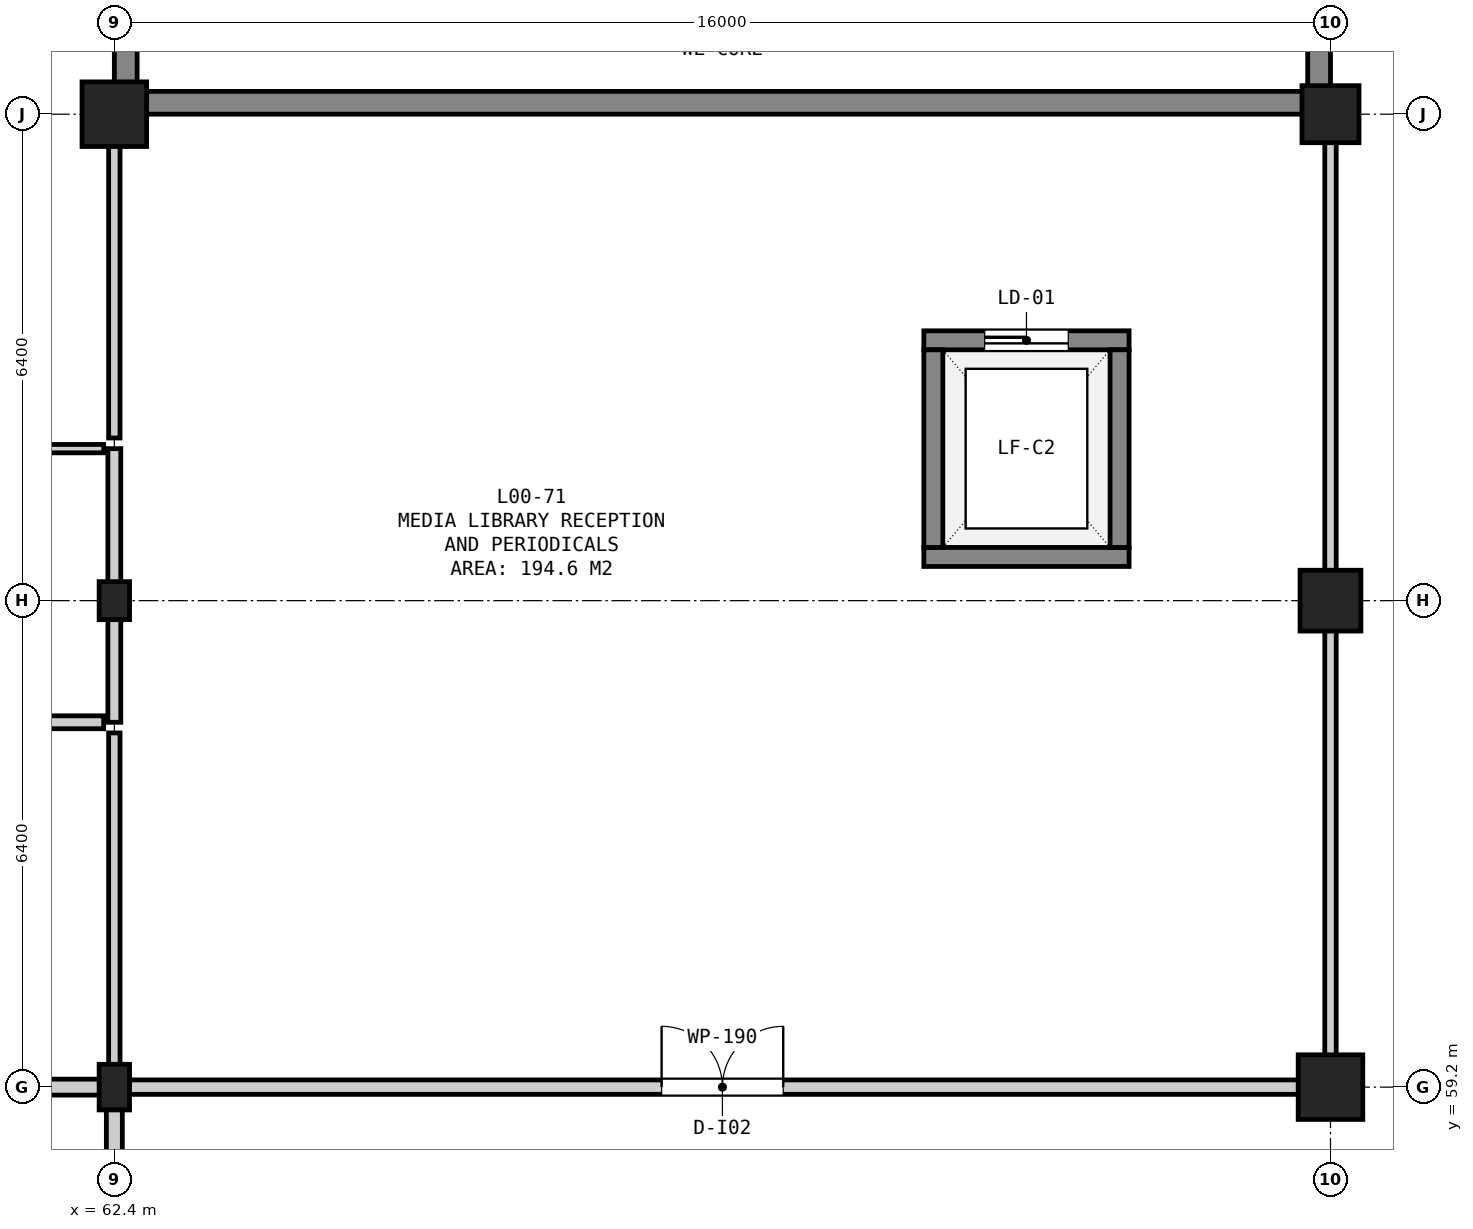
"""IFC4 building model, lengths in metres.
Left out: names, types, materials, properties, quantities, classifications, styles, units other than length and angle.
Written with IfcOpenShell. Run it as: python <this file> out.ifc"""

import sys

from ifc_helpers import new_model, si_unit, direction, frame, frame_2d, origin, origin_2d, place, context, subcontext, project, spatial, rectangle, extrude, element, fill, save


model = new_model("IFC4")
c1 = context("Model", 3, precision=1e-05, world=origin(), true_north=direction((0.0, 1.0)))
c2 = subcontext(c1, "Body", "Model", "MODEL_VIEW")
j1 = project(units=[si_unit("LENGTHUNIT", "METRE"), si_unit("PLANEANGLEUNIT", "RADIAN")], contexts=[c1])
p1 = place(None, origin())
s1 = spatial("IfcSite", under=j1, at=p1, CompositionType="ELEMENT")
p2 = place(p1, origin())
s2 = spatial("IfcBuilding", under=s1, at=p2, CompositionType="ELEMENT")
p3 = place(p2, origin())
s3 = spatial("IfcBuildingStorey", under=s2, at=p3, CompositionType="ELEMENT", Elevation=0.0)
p4 = place(p3, frame((62.4, 59.2, 0.0), z_axis=(0.0, 0.0, 1.0), x_axis=(1.0, 0.0, 0.0)))
e1 = element("IfcColumn", 1, at=p4, inside=s3, PredefinedType="COLUMN", context=c2, shape_type="SweptSolid", body=[
    extrude(rectangle(XDim=0.4, YDim=0.6, at=origin_2d()), origin(), (0.0, 0.0, 1.0), 5.4),
])
p5 = place(p3, frame((62.4, 65.6, 0.0), z_axis=(0.0, 0.0, 1.0), x_axis=(1.0, 0.0, 0.0)))
e2 = element("IfcColumn", 2, at=p5, inside=s3, PredefinedType="COLUMN", context=c2, shape_type="SweptSolid", body=[
    extrude(rectangle(XDim=0.4, YDim=0.5, at=origin_2d()), origin(), (0.0, 0.0, 1.0), 5.4),
])
for number, where, z_axis, x_axis in (
    (3, (62.4, 72.0, 0.0), (0.0, 0.0, 1.0), (1.0, 0.0, 0.0)),
    (4, (78.4, 59.2, 0.0), (0.0, 0.0, 1.0), (1.0, 0.0, 0.0)),
):
    element("IfcColumn", number, at=place(p3, frame(where, z_axis=z_axis, x_axis=x_axis)), inside=s3, PredefinedType="COLUMN", context=c2, shape_type="SweptSolid", body=[
        extrude(rectangle(XDim=0.85, YDim=0.85, at=origin_2d()), origin(), (0.0, 0.0, 1.0), 5.4),
    ])
p6 = place(p3, frame((78.4, 65.6, 0.0), z_axis=(0.0, 0.0, 1.0), x_axis=(1.0, 0.0, 0.0)))
e5 = element("IfcColumn", 5, at=p6, inside=s3, PredefinedType="COLUMN", context=c2, shape_type="SweptSolid", body=[
    extrude(rectangle(XDim=0.8, YDim=0.8, at=origin_2d()), origin(), (0.0, 0.0, 1.0), 5.4),
])
p7 = place(p3, frame((78.4, 72.0, 0.0), z_axis=(0.0, 0.0, 1.0), x_axis=(1.0, 0.0, 0.0)))
e6 = element("IfcColumn", 6, at=p7, inside=s3, PredefinedType="COLUMN", context=c2, shape_type="SweptSolid", body=[
    extrude(rectangle(XDim=0.75, YDim=0.75, at=origin_2d()), origin(), (0.0, 0.0, 1.0), 5.4),
])
p8 = place(p3, frame((62.7, 72.15, 0.0), z_axis=(0.0, 0.0, 1.0), x_axis=(1.0, 0.0, 0.0)))
e7 = element("IfcWall", 7, at=p8, inside=s3, PredefinedType="SHEAR", context=c2, shape_type="SweptSolid", body=[
    extrude(rectangle(XDim=15.4, YDim=0.3, at=frame_2d((7.7, 0.0))), origin(), (0.0, 0.0, 1.0), 5.08),
])
for number, where, z_axis, x_axis in (
    (8, (62.55, 72.0, 0.0), (0.0, 0.0, 1.0), (0.0, 1.0, 0.0)),
    (9, (78.25, 72.0, 0.0), (0.0, 0.0, 1.0), (0.0, 1.0, 0.0)),
):
    element("IfcWall", number, at=place(p3, frame(where, z_axis=z_axis, x_axis=x_axis)), inside=s3, PredefinedType="SHEAR", context=c2, shape_type="SweptSolid", body=[
        extrude(rectangle(XDim=15.2, YDim=0.3, at=frame_2d((7.6, 0.0))), origin(), (0.0, 0.0, 1.0), 5.08),
    ])
p9 = place(p3, frame((73.05, 66.175, 0.0), z_axis=(0.0, 0.0, 1.0), x_axis=(1.0, 0.0, 0.0)))
e10 = element("IfcWall", 10, at=p9, inside=s3, PredefinedType="SHEAR", context=c2, shape_type="SweptSolid", body=[
    extrude(rectangle(XDim=2.7, YDim=0.25, at=frame_2d((1.35, 0.0))), origin(), (0.0, 0.0, 1.0), 5.08),
])
p10 = place(p3, frame((73.05, 69.025, 0.0), z_axis=(0.0, 0.0, 1.0), x_axis=(1.0, 0.0, 0.0)))
e11 = element("IfcWall", 11, at=p10, inside=s3, PredefinedType="SHEAR", context=c2, shape_type="SweptSolid", body=[
    extrude(rectangle(XDim=2.7, YDim=0.25, at=frame_2d((1.35, 0.0))), origin(), (0.0, 0.0, 1.0), 5.08),
])
p11 = place(p10, frame((0.8, 0.0, 0.0)))
e12 = element("IfcOpeningElement", 12, at=p11, cuts=e11, PredefinedType="OPENING", context=c2, shape_type="SweptSolid", body=[
    extrude(rectangle(XDim=1.1, YDim=2.15, at=frame_2d((0.55, 1.075))), frame((0.0, 0.137, 0.0), z_axis=(0.0, -1.0, 0.0), x_axis=(1.0, 0.0, 0.0)), (0.0, 0.0, 1.0), 0.274),
])
for number, where, z_axis, x_axis in (
    (13, (73.175, 66.3, 0.0), (0.0, 0.0, 1.0), (0.0, 1.0, 0.0)),
    (14, (75.625, 66.3, 0.0), (0.0, 0.0, 1.0), (0.0, 1.0, 0.0)),
):
    element("IfcWall", number, at=place(p3, frame(where, z_axis=z_axis, x_axis=x_axis)), inside=s3, PredefinedType="SHEAR", context=c2, shape_type="SweptSolid", body=[
        extrude(rectangle(XDim=2.6, YDim=0.25, at=frame_2d((1.3, 0.0))), origin(), (0.0, 0.0, 1.0), 5.08),
    ])
p12 = place(p3, frame((48.14, 59.2, 0.0), z_axis=(0.0, 0.0, 1.0), x_axis=(1.0, 0.0, 0.0)))
e15 = element("IfcWall", 15, at=p12, inside=s3, PredefinedType="SOLIDWALL", context=c2, shape_type="SweptSolid", body=[
    extrude(rectangle(XDim=14.12, YDim=0.21, at=frame_2d((7.06, 0.0))), origin(), (0.0, 0.0, 1.0), 4.575),
])
p13 = place(p12, frame((2.585, 0.0, 0.0)))
e16 = element("IfcOpeningElement", 16, at=p13, cuts=e15, PredefinedType="OPENING", context=c2, shape_type="SweptSolid", body=[
    extrude(rectangle(XDim=0.95, YDim=2.15, at=frame_2d((0.475, 1.075))), frame((0.0, 0.117, 0.0), z_axis=(0.0, -1.0, 0.0), x_axis=(1.0, 0.0, 0.0)), (0.0, 0.0, 1.0), 0.234),
])
p14 = place(p12, frame((10.735, 0.0, 0.0)))
e17 = element("IfcOpeningElement", 17, at=p14, cuts=e15, PredefinedType="OPENING", context=c2, shape_type="SweptSolid", body=[
    extrude(rectangle(XDim=1.05, YDim=2.15, at=frame_2d((0.525, 1.075))), frame((0.0, 0.117, 0.0), z_axis=(0.0, -1.0, 0.0), x_axis=(1.0, 0.0, 0.0)), (0.0, 0.0, 1.0), 0.234),
])
p15 = place(p3, frame((62.4, 51.34, 0.0), z_axis=(0.0, 0.0, 1.0), x_axis=(0.0, 1.0, 0.0)))
e18 = element("IfcWall", 18, at=p15, inside=s3, PredefinedType="SOLIDWALL", context=c2, shape_type="SweptSolid", body=[
    extrude(rectangle(XDim=7.72, YDim=0.21, at=frame_2d((3.86, 0.0))), origin(), (0.0, 0.0, 1.0), 4.375),
])
p16 = place(p15, frame((3.06, 0.0, 0.0)))
e19 = element("IfcOpeningElement", 19, at=p16, cuts=e18, PredefinedType="OPENING", context=c2, shape_type="SweptSolid", body=[
    extrude(rectangle(XDim=1.6, YDim=2.2, at=frame_2d((0.8, 1.1))), frame((0.0, 0.117, 0.0), z_axis=(0.0, -1.0, 0.0), x_axis=(1.0, 0.0, 0.0)), (0.0, 0.0, 1.0), 0.234),
])
p17 = place(p3, frame((56.54, 64.0, 0.0), z_axis=(0.0, 0.0, 1.0), x_axis=(1.0, 0.0, 0.0)))
e20 = element("IfcWall", 20, at=p17, inside=s3, PredefinedType="PARTITIONING", context=c2, shape_type="SweptSolid", body=[
    extrude(rectangle(XDim=5.72, YDim=0.17, at=frame_2d((2.86, 0.0))), origin(), (0.0, 0.0, 1.0), 5.08),
])
p18 = place(p3, frame((62.4, 59.34, 0.0), z_axis=(0.0, 0.0, 1.0), x_axis=(0.0, 1.0, 0.0)))
e21 = element("IfcWall", 21, at=p18, inside=s3, PredefinedType="PARTITIONING", context=c2, shape_type="SweptSolid", body=[
    extrude(rectangle(XDim=4.52, YDim=0.15, at=frame_2d((2.26, 0.0))), origin(), (0.0, 0.0, 1.0), 4.275),
])
p19 = place(p3, frame((56.4, 67.6, 0.0), z_axis=(0.0, 0.0, 1.0), x_axis=(1.0, 0.0, 0.0)))
e22 = element("IfcWall", 22, at=p19, inside=s3, PredefinedType="PARTITIONING", context=c2, shape_type="SweptSolid", body=[
    extrude(rectangle(XDim=5.86, YDim=0.11, at=frame_2d((2.93, 0.0))), origin(), (0.0, 0.0, 1.0), 5.08),
])
p20 = place(p3, frame((62.4, 67.74, 0.0), z_axis=(0.0, 0.0, 1.0), x_axis=(0.0, 1.0, 0.0)))
e23 = element("IfcWall", 23, at=p20, inside=s3, PredefinedType="PARTITIONING", context=c2, shape_type="SweptSolid", body=[
    extrude(rectangle(XDim=4.12, YDim=0.15, at=frame_2d((2.06, 0.0))), origin(), (0.0, 0.0, 1.0), 4.325),
])
p21 = place(p3, frame((62.54, 59.2, 0.0), z_axis=(0.0, 0.0, 1.0), x_axis=(1.0, 0.0, 0.0)))
e24 = element("IfcWall", 24, at=p21, inside=s3, PredefinedType="PARTITIONING", context=c2, shape_type="SweptSolid", body=[
    extrude(rectangle(XDim=15.72, YDim=0.19, at=frame_2d((7.86, 0.0))), origin(), (0.0, 0.0, 1.0), 4.425),
])
p22 = place(p21, frame((7.06, 0.0, 0.0)))
e25 = element("IfcOpeningElement", 25, at=p22, cuts=e24, PredefinedType="OPENING", context=c2, shape_type="SweptSolid", body=[
    extrude(rectangle(XDim=1.6, YDim=2.2, at=frame_2d((0.8, 1.1))), frame((0.0, 0.107, 0.0), z_axis=(0.0, -1.0, 0.0), x_axis=(1.0, 0.0, 0.0)), (0.0, 0.0, 1.0), 0.214),
])
p23 = place(p3, frame((62.4, 64.0, 0.0), z_axis=(0.0, 0.0, 1.0), x_axis=(0.0, 1.0, 0.0)))
e26 = element("IfcWall", 26, at=p23, inside=s3, PredefinedType="PARTITIONING", context=c2, shape_type="SweptSolid", body=[
    extrude(rectangle(XDim=3.6, YDim=0.17, at=frame_2d((1.8, 0.0))), origin(), (0.0, 0.0, 1.0), 4.275),
])
p24 = place(p3, frame((78.4, 59.34, 0.0), z_axis=(0.0, 0.0, 1.0), x_axis=(0.0, 1.0, 0.0)))
e27 = element("IfcWall", 27, at=p24, inside=s3, PredefinedType="PARTITIONING", context=c2, shape_type="SweptSolid", body=[
    extrude(rectangle(XDim=12.52, YDim=0.15, at=frame_2d((6.26, 0.0))), origin(), (0.0, 0.0, 1.0), 4.575),
])
p25 = place(p11, origin())
e28 = element("IfcDoor", 28, at=p25, inside=s3, OperationType="SLIDING_TO_LEFT", PredefinedType="DOOR", context=c2, shape_type="SweptSolid", body=[
    extrude(rectangle(XDim=1.1, YDim=2.15, at=frame_2d((0.55, 1.075))), frame((0.0, 0.025, 0.0), z_axis=(0.0, -1.0, 0.0), x_axis=(1.0, 0.0, 0.0)), (0.0, 0.0, 1.0), 0.05),
])
fill(e12, e28)
p26 = place(p22, origin())
e29 = element("IfcDoor", 29, at=p26, inside=s3, OperationType="DOUBLE_DOOR_SINGLE_SWING", PredefinedType="DOOR", context=c2, shape_type="SweptSolid", body=[
    extrude(rectangle(XDim=1.6, YDim=2.2, at=frame_2d((0.8, 1.1))), frame((0.0, 0.025, 0.0), z_axis=(0.0, -1.0, 0.0), x_axis=(1.0, 0.0, 0.0)), (0.0, 0.0, 1.0), 0.05),
])
fill(e25, e29)
save(model, sys.argv[1])
